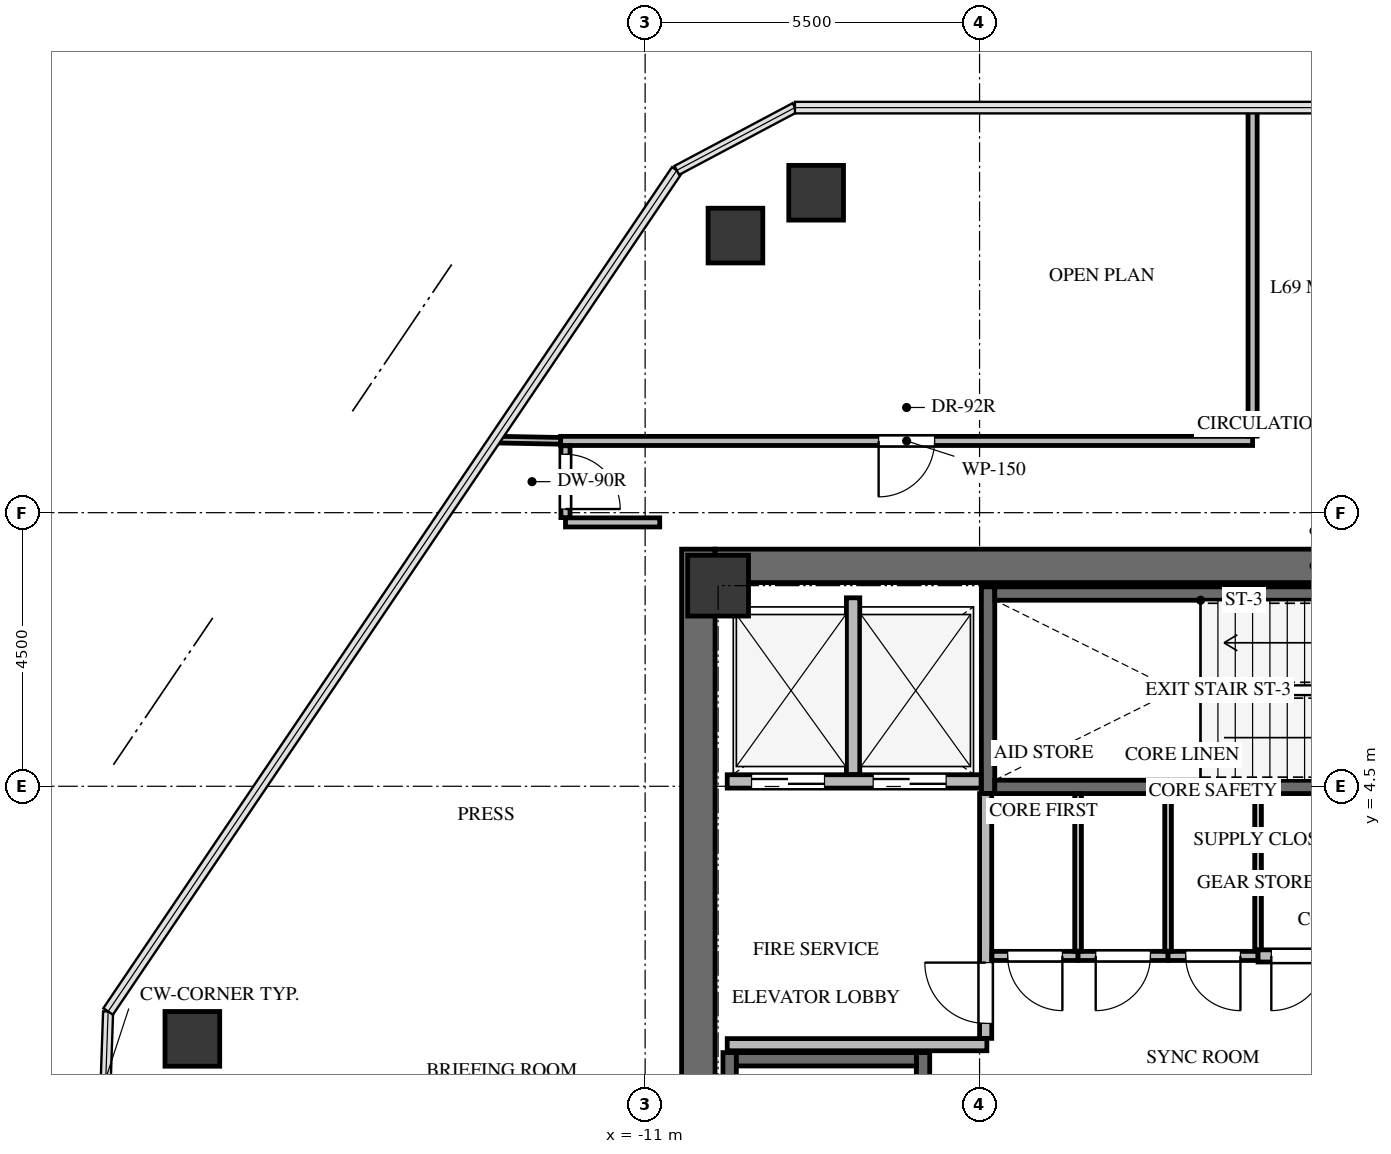
"""IFC4 building model, lengths in metres.
Left out: names, types, materials, properties, quantities, classifications, styles, units other than length and angle.
Written with IfcOpenShell. Run it as: python <this file> out.ifc"""

import sys

from ifc_helpers import new_model, si_unit, direction, frame, frame_2d, origin, origin_2d, place, context, subcontext, project, spatial, rectangle, extrude, source, transform, mapped, element, fill, save


model = new_model("IFC4")
c1 = context("Model", 3, precision=1e-05, world=origin(), true_north=direction((0.0, 1.0)))
c2 = subcontext(c1, "Body", "Model", "MODEL_VIEW")
j1 = project(units=[si_unit("LENGTHUNIT", "METRE"), si_unit("PLANEANGLEUNIT", "RADIAN")], contexts=[c1])
p1 = place(None, origin())
s1 = spatial("IfcSite", under=j1, at=p1, CompositionType="ELEMENT")
p2 = place(p1, origin())
s2 = spatial("IfcBuilding", under=s1, at=p2, CompositionType="ELEMENT")
p3 = place(p2, frame((0.0, 0.0, 248.0)))
s3 = spatial("IfcBuildingStorey", under=s2, at=p3, CompositionType="ELEMENT", Elevation=248.0)
p4 = place(p3, frame((-10.125, -8.4, 0.0), z_axis=(0.0, 0.0, 1.0), x_axis=(0.0, 1.0, 0.0)))
e1 = element("IfcWall", 1, at=p4, inside=s3, PredefinedType="SHEAR", context=c2, shape_type="SweptSolid", body=[
    extrude(rectangle(XDim=16.8, YDim=0.55, at=frame_2d((8.4, 0.0))), origin(), (0.0, 0.0, 1.0), 3.3),
])
p5 = place(p3, frame((-9.85, 8.125, 0.0), z_axis=(0.0, 0.0, 1.0), x_axis=(1.0, 0.0, 0.0)))
e2 = element("IfcWall", 2, at=p5, inside=s3, PredefinedType="SHEAR", context=c2, shape_type="SweptSolid", body=[
    extrude(rectangle(XDim=19.7, YDim=0.55, at=frame_2d((9.85, 0.0))), origin(), (0.0, 0.0, 1.0), 3.3),
])
p6 = place(p3, frame((-6.43, -7.77, -0.24), z_axis=(0.0, 0.0, 1.0), x_axis=(0.0, 1.0, 0.0)))
e3 = element("IfcWall", 3, at=p6, inside=s3, PredefinedType="SHEAR", context=c2, shape_type="SweptSolid", body=[
    extrude(rectangle(XDim=7.89, YDim=0.22, at=frame_2d((3.945, 0.0))), origin(), (0.0, 0.0, 1.0), 3.3),
])
p7 = place(p6, frame((6.32, 0.0, 0.0)))
e4 = element("IfcOpeningElement", 4, at=p7, cuts=e3, PredefinedType="OPENING", context=c2, shape_type="SweptSolid", body=[
    extrude(rectangle(XDim=1.05, YDim=2.15, at=frame_2d((0.525, 1.075))), frame((0.0, 0.12, 0.0), z_axis=(0.0, -1.0, 0.0), x_axis=(1.0, 0.0, 0.0)), (0.0, 0.0, 1.0), 0.24),
])
p8 = place(p3, frame((-9.61, 0.12, -0.24), z_axis=(0.0, 0.0, 1.0), x_axis=(0.0, -1.0, 0.0)))
e5 = element("IfcWall", 5, at=p8, inside=s3, PredefinedType="SHEAR", context=c2, shape_type="SweptSolid", body=[
    extrude(rectangle(XDim=7.89, YDim=0.22, at=frame_2d((3.945, 0.0))), origin(), (0.0, 0.0, 1.0), 3.3),
])
p9 = place(p3, frame((-6.54, 0.01, -0.24), z_axis=(0.0, 0.0, 1.0), x_axis=(-1.0, 0.0, 0.0)))
e6 = element("IfcWall", 6, at=p9, inside=s3, PredefinedType="SHEAR", context=c2, shape_type="SweptSolid", body=[
    extrude(rectangle(XDim=2.96, YDim=0.22, at=frame_2d((1.48, 0.0))), origin(), (0.0, 0.0, 1.0), 3.3),
])
p10 = place(p3, frame((-5.36, 7.78, -0.24), z_axis=(0.0, 0.0, 1.0), x_axis=(0.0, -1.0, 0.0)))
e7 = element("IfcWall", 7, at=p10, inside=s3, PredefinedType="SHEAR", context=c2, shape_type="SweptSolid", body=[
    extrude(rectangle(XDim=3.4, YDim=0.22, at=frame_2d((1.7, 0.0))), origin(), (0.0, 0.0, 1.0), 3.3),
])
p11 = place(p3, frame((-5.25, 4.49, -0.24), z_axis=(0.0, 0.0, 1.0), x_axis=(1.0, 0.0, 0.0)))
e8 = element("IfcWall", 8, at=p11, inside=s3, PredefinedType="SHEAR", context=c2, shape_type="SweptSolid", body=[
    extrude(rectangle(XDim=7.35, YDim=0.22, at=frame_2d((3.675, 0.0))), origin(), (0.0, 0.0, 1.0), 3.3),
])
p12 = place(p11, frame((5.85, 0.0, 0.0)))
e9 = element("IfcOpeningElement", 9, at=p12, cuts=e8, PredefinedType="OPENING", context=c2, shape_type="SweptSolid", body=[
    extrude(rectangle(XDim=1.05, YDim=2.15, at=frame_2d((0.525, 1.075))), frame((0.0, 0.12, 0.0), z_axis=(0.0, -1.0, 0.0), x_axis=(1.0, 0.0, 0.0)), (0.0, 0.0, 1.0), 0.24),
])
p13 = place(p3, frame((2.1, 7.67, -0.24), z_axis=(0.0, 0.0, 1.0), x_axis=(-1.0, 0.0, 0.0)))
e10 = element("IfcWall", 10, at=p13, inside=s3, PredefinedType="SHEAR", context=c2, shape_type="SweptSolid", body=[
    extrude(rectangle(XDim=7.35, YDim=0.22, at=frame_2d((3.675, 0.0))), origin(), (0.0, 0.0, 1.0), 3.3),
])
m1 = source(origin(), c2, "Body", "SweptSolid", [
    extrude(rectangle(XDim=1.0, YDim=1.0, at=origin_2d()), origin(), (0.0, 0.0, 1.0), 3.3),
])
p14 = place(p3, frame((-9.8, 7.8, -0.24), z_axis=(0.0, 0.0, 1.0), x_axis=(1.0, 0.0, 0.0)))
e11 = element("IfcColumn", 11, at=p14, inside=s3, PredefinedType="COLUMN", context=c2, shape_type="MappedRepresentation", body=[
    mapped(m1, transform((0.0, 0.0, 0.0), x_axis=(1.0, 0.0, 0.0), y_axis=(0.0, 1.0, 0.0), z_axis=(0.0, 0.0, 1.0), scale=1.0)),
])
m2 = source(origin(), c2, "Body", "SweptSolid", [
    extrude(rectangle(XDim=0.9, YDim=0.9, at=origin_2d()), origin(), (0.0, 0.0, 1.0), 3.3),
])
for number, where, z_axis, x_axis in (
    (12, (-18.446, 0.346, -0.24), (0.0, 0.0, 1.0), (1.0, 0.0, 0.0)),
    (13, (-9.515, 13.557, -0.24), (0.0, 0.0, 1.0), (1.0, 0.0, 0.0)),
    (14, (-8.188, 14.262, -0.24), (0.0, 0.0, 1.0), (1.0, 0.0, 0.0)),
):
    element("IfcColumn", number, at=place(p3, frame(where, z_axis=z_axis, x_axis=x_axis)), inside=s3, PredefinedType="COLUMN", context=c2, shape_type="MappedRepresentation", body=[
        mapped(m2, transform((0.0, 0.0, 0.0), x_axis=(1.0, 0.0, 0.0), y_axis=(0.0, 1.0, 0.0), z_axis=(0.0, 0.0, 1.0), scale=1.0)),
    ])
p15 = place(p3, frame((-9.65, 4.58, 0.0), z_axis=(0.0, 0.0, 1.0), x_axis=(1.0, 0.0, 0.0)))
e15 = element("IfcWall", 15, at=p15, inside=s3, PredefinedType="SOLIDWALL", context=c2, shape_type="SweptSolid", body=[
    extrude(rectangle(XDim=4.175, YDim=0.22, at=frame_2d((2.087, 0.0))), origin(), (0.0, 0.0, 1.0), 3.045),
])
p16 = place(p15, frame((0.4, 0.0, 0.0)))
e16 = element("IfcOpeningElement", 16, at=p16, cuts=e15, PredefinedType="OPENING", context=c2, shape_type="SweptSolid", body=[
    extrude(rectangle(XDim=1.2, YDim=2.15, at=frame_2d((0.6, 1.075))), frame((0.0, 0.12, 0.0), z_axis=(0.0, -1.0, 0.0), x_axis=(1.0, 0.0, 0.0)), (0.0, 0.0, 1.0), 0.24),
])
p17 = place(p15, frame((2.4, 0.0, 0.0)))
e17 = element("IfcOpeningElement", 17, at=p17, cuts=e15, PredefinedType="OPENING", context=c2, shape_type="SweptSolid", body=[
    extrude(rectangle(XDim=1.2, YDim=2.15, at=frame_2d((0.6, 1.075))), frame((0.0, 0.12, 0.0), z_axis=(0.0, -1.0, 0.0), x_axis=(1.0, 0.0, 0.0)), (0.0, 0.0, 1.0), 0.24),
])
p18 = place(p3, frame((-7.58, 4.694, 0.0), z_axis=(0.0, 0.0, 1.0), x_axis=(0.0, 1.0, 0.0)))
e18 = element("IfcWall", 18, at=p18, inside=s3, PredefinedType="SOLIDWALL", context=c2, shape_type="SweptSolid", body=[
    extrude(rectangle(XDim=2.906, YDim=0.22, at=frame_2d((1.453, 0.0))), origin(), (0.0, 0.0, 1.0), 3.045),
])
p19 = place(p3, frame((-9.65, 0.25, 0.0), z_axis=(0.0, 0.0, 1.0), x_axis=(1.0, 0.0, 0.0)))
e19 = element("IfcWall", 19, at=p19, inside=s3, PredefinedType="SOLIDWALL", context=c2, shape_type="SweptSolid", body=[
    extrude(rectangle(XDim=4.27, YDim=0.2, at=frame_2d((2.135, 0.0))), origin(), (0.0, 0.0, 1.0), 3.045),
])
p20 = place(p3, frame((-5.4, 0.354, 0.0), z_axis=(0.0, 0.0, 1.0), x_axis=(0.0, 1.0, 0.0)))
e20 = element("IfcWall", 20, at=p20, inside=s3, PredefinedType="SOLIDWALL", context=c2, shape_type="SweptSolid", body=[
    extrude(rectangle(XDim=4.026, YDim=0.2, at=frame_2d((2.013, 0.0))), origin(), (0.0, 0.0, 1.0), 3.045),
])
p21 = place(p20, frame((0.246, 0.0, 0.0)))
e21 = element("IfcOpeningElement", 21, at=p21, cuts=e20, PredefinedType="OPENING", context=c2, shape_type="SweptSolid", body=[
    extrude(rectangle(XDim=1.0, YDim=2.15, at=frame_2d((0.5, 1.075))), frame((0.0, 0.11, 0.0), z_axis=(0.0, -1.0, 0.0), x_axis=(1.0, 0.0, 0.0)), (0.0, 0.0, 1.0), 0.22),
])
p22 = place(p3, frame((-3.88, 1.71, 0.0), z_axis=(0.0, 0.0, 1.0), x_axis=(-1.0, 0.0, 0.0)))
e22 = element("IfcWall", 22, at=p22, inside=s3, PredefinedType="PARTITIONING", context=c2, shape_type="SweptSolid", body=[
    extrude(rectangle(XDim=1.416, YDim=0.15, at=frame_2d((0.708, 0.0))), origin(), (0.0, 0.0, 1.0), 3.045),
])
p23 = place(p22, frame((0.258, 0.0, 0.0)))
e23 = element("IfcOpeningElement", 23, at=p23, cuts=e22, PredefinedType="OPENING", context=c2, shape_type="SweptSolid", body=[
    extrude(rectangle(XDim=0.9, YDim=2.05, at=frame_2d((0.45, 1.025))), frame((0.0, 0.085, 0.0), z_axis=(0.0, -1.0, 0.0), x_axis=(1.0, 0.0, 0.0)), (0.0, 0.0, 1.0), 0.17),
])
p24 = place(p3, frame((-2.4, 1.71, 0.0), z_axis=(0.0, 0.0, 1.0), x_axis=(-1.0, 0.0, 0.0)))
e24 = element("IfcWall", 24, at=p24, inside=s3, PredefinedType="PARTITIONING", context=c2, shape_type="SweptSolid", body=[
    extrude(rectangle(XDim=1.48, YDim=0.15, at=frame_2d((0.74, 0.0))), origin(), (0.0, 0.0, 1.0), 3.045),
])
p25 = place(p24, frame((0.29, 0.0, 0.0)))
e25 = element("IfcOpeningElement", 25, at=p25, cuts=e24, PredefinedType="OPENING", context=c2, shape_type="SweptSolid", body=[
    extrude(rectangle(XDim=0.9, YDim=2.05, at=frame_2d((0.45, 1.025))), frame((0.0, 0.085, 0.0), z_axis=(0.0, -1.0, 0.0), x_axis=(1.0, 0.0, 0.0)), (0.0, 0.0, 1.0), 0.17),
])
p26 = place(p3, frame((-0.92, 1.71, 0.0), z_axis=(0.0, 0.0, 1.0), x_axis=(-1.0, 0.0, 0.0)))
e26 = element("IfcWall", 26, at=p26, inside=s3, PredefinedType="PARTITIONING", context=c2, shape_type="SweptSolid", body=[
    extrude(rectangle(XDim=1.48, YDim=0.15, at=frame_2d((0.74, 0.0))), origin(), (0.0, 0.0, 1.0), 3.045),
])
p27 = place(p26, frame((0.29, 0.0, 0.0)))
e27 = element("IfcOpeningElement", 27, at=p27, cuts=e26, PredefinedType="OPENING", context=c2, shape_type="SweptSolid", body=[
    extrude(rectangle(XDim=0.9, YDim=2.05, at=frame_2d((0.45, 1.025))), frame((0.0, 0.085, 0.0), z_axis=(0.0, -1.0, 0.0), x_axis=(1.0, 0.0, 0.0)), (0.0, 0.0, 1.0), 0.17),
])
p28 = place(p3, frame((0.416, 1.71, 0.0), z_axis=(0.0, 0.0, 1.0), x_axis=(-1.0, 0.0, 0.0)))
e28 = element("IfcWall", 28, at=p28, inside=s3, PredefinedType="SOLIDWALL", context=c2, shape_type="SweptSolid", body=[
    extrude(rectangle(XDim=1.336, YDim=0.2, at=frame_2d((0.668, 0.0))), origin(), (0.0, 0.0, 1.0), 3.045),
])
p29 = place(p28, frame((0.218, 0.0, 0.0)))
e29 = element("IfcOpeningElement", 29, at=p29, cuts=e28, PredefinedType="OPENING", context=c2, shape_type="SweptSolid", body=[
    extrude(rectangle(XDim=0.9, YDim=2.05, at=frame_2d((0.45, 1.025))), frame((0.0, 0.11, 0.0), z_axis=(0.0, -1.0, 0.0), x_axis=(1.0, 0.0, 0.0)), (0.0, 0.0, 1.0), 0.22),
])
p30 = place(p3, frame((-1.01, 10.18, 0.0), z_axis=(0.0, 0.0, 1.0), x_axis=(-1.0, 0.0, 0.0)))
e30 = element("IfcWall", 30, at=p30, inside=s3, PredefinedType="PARTITIONING", context=c2, shape_type="SweptSolid", body=[
    extrude(rectangle(XDim=11.38, YDim=0.15, at=frame_2d((5.69, 0.0))), origin(), (0.0, 0.0, 1.0), 2.301),
])
p31 = place(p30, frame((5.23, 0.0, 0.0)))
e31 = element("IfcOpeningElement", 31, at=p31, cuts=e30, PredefinedType="OPENING", context=c2, shape_type="SweptSolid", body=[
    extrude(rectangle(XDim=0.92, YDim=2.1, at=frame_2d((0.46, 1.05))), frame((0.0, 0.085, 0.0), z_axis=(0.0, -1.0, 0.0), x_axis=(1.0, 0.0, 0.0)), (0.0, 0.0, 1.0), 0.17),
])
p32 = place(p3, frame((-1.01, 15.662, 0.0), z_axis=(0.0, 0.0, 1.0), x_axis=(0.0, -1.0, 0.0)))
e32 = element("IfcWall", 32, at=p32, inside=s3, PredefinedType="PARTITIONING", context=c2, shape_type="SweptSolid", body=[
    extrude(rectangle(XDim=5.403, YDim=0.15, at=frame_2d((2.702, 0.0))), origin(), (0.0, 0.0, 1.0), 2.399),
])
p33 = place(p3, frame((-12.31, 8.84, 0.0), z_axis=(0.0, 0.0, 1.0), x_axis=(1.0, 0.0, 0.0)))
e33 = element("IfcWall", 33, at=p33, inside=s3, PredefinedType="PARTITIONING", context=c2, shape_type="SweptSolid", body=[
    extrude(rectangle(XDim=1.55, YDim=0.15, at=frame_2d((0.775, 0.0))), origin(), (0.0, 0.0, 1.0), 3.045),
])
p34 = place(p3, frame((-12.31, 10.101, 0.0), z_axis=(0.0, 0.0, 1.0), x_axis=(0.0, -1.0, 0.0)))
e34 = element("IfcWall", 34, at=p34, inside=s3, PredefinedType="PARTITIONING", context=c2, shape_type="SweptSolid", body=[
    extrude(rectangle(XDim=1.182, YDim=0.15, at=frame_2d((0.591, 0.0))), origin(), (0.0, 0.0, 1.0), 2.399),
])
p35 = place(p34, frame((0.141, 0.0, 0.0)))
e35 = element("IfcOpeningElement", 35, at=p35, cuts=e34, PredefinedType="OPENING", context=c2, shape_type="SweptSolid", body=[
    extrude(rectangle(XDim=0.9, YDim=2.05, at=frame_2d((0.45, 1.025))), frame((0.0, 0.085, 0.0), z_axis=(0.0, -1.0, 0.0), x_axis=(1.0, 0.0, 0.0)), (0.0, 0.0, 1.0), 0.17),
])
for number, where, z_axis, x_axis in (
    (36, (-3.88, 4.375, 0.0), (0.0, 0.0, 1.0), (0.0, -1.0, 0.0)),
    (37, (-2.4, 4.375, 0.0), (0.0, 0.0, 1.0), (0.0, -1.0, 0.0)),
):
    element("IfcWall", number, at=place(p3, frame(where, z_axis=z_axis, x_axis=x_axis)), inside=s3, PredefinedType="MOVABLE", context=c2, shape_type="SweptSolid", body=[
        extrude(rectangle(XDim=2.586, YDim=0.11, at=frame_2d((1.293, 0.0))), origin(), (0.0, 0.0, 1.0), 3.045),
    ])
p36 = place(p3, frame((-0.92, 4.375, 0.0), z_axis=(0.0, 0.0, 1.0), x_axis=(0.0, -1.0, 0.0)))
e38 = element("IfcWall", 38, at=p36, inside=s3, PredefinedType="MOVABLE", context=c2, shape_type="SweptSolid", body=[
    extrude(rectangle(XDim=2.561, YDim=0.11, at=frame_2d((1.281, 0.0))), origin(), (0.0, 0.0, 1.0), 3.045),
])
p37 = place(p3, frame((-12.39, 10.181, 0.0), z_axis=(0.0, 0.0, 1.0), x_axis=(-0.999812128272, 0.019383192748, 0.0)))
e39 = element("IfcWall", 39, at=p37, inside=s3, PredefinedType="MOVABLE", context=c2, shape_type="SweptSolid", body=[
    extrude(rectangle(XDim=1.083, YDim=0.11, at=frame_2d((0.542, 0.0))), origin(), (0.0, 0.0, 1.0), 3.045),
])
m3 = source(origin(), c2, "Body", "SweptSolid", [
    extrude(rectangle(XDim=1.2, YDim=2.15, at=frame_2d((0.6, 1.075))), frame((0.0, 0.025, 0.0), z_axis=(0.0, -1.0, 0.0), x_axis=(1.0, 0.0, 0.0)), (0.0, 0.0, 1.0), 0.05),
])
p38 = place(p16, origin())
e40 = element("IfcDoor", 40, at=p38, inside=s3, OperationType="DOUBLE_DOOR_SLIDING", PredefinedType="DOOR", context=c2, shape_type="MappedRepresentation", body=[
    mapped(m3, transform((0.0, 0.0, 0.0), x_axis=(1.0, 0.0, 0.0), y_axis=(0.0, 1.0, 0.0), z_axis=(0.0, 0.0, 1.0), scale=1.0)),
])
fill(e16, e40)
p39 = place(p17, origin())
e41 = element("IfcDoor", 41, at=p39, inside=s3, OperationType="DOUBLE_DOOR_SLIDING", PredefinedType="DOOR", context=c2, shape_type="MappedRepresentation", body=[
    mapped(m3, transform((0.0, 0.0, 0.0), x_axis=(1.0, 0.0, 0.0), y_axis=(0.0, 1.0, 0.0), z_axis=(0.0, 0.0, 1.0), scale=1.0)),
])
fill(e17, e41)
m4 = source(origin(), c2, "Body", "SweptSolid", [
    extrude(rectangle(XDim=1.0, YDim=2.15, at=frame_2d((0.5, 1.075))), frame((0.0, 0.025, 0.0), z_axis=(0.0, -1.0, 0.0), x_axis=(1.0, 0.0, 0.0)), (0.0, 0.0, 1.0), 0.05),
])
p40 = place(p21, origin())
e42 = element("IfcDoor", 42, at=p40, inside=s3, OperationType="SINGLE_SWING_RIGHT", PredefinedType="DOOR", context=c2, shape_type="MappedRepresentation", body=[
    mapped(m4, transform((0.0, 0.0, 0.0), x_axis=(1.0, 0.0, 0.0), y_axis=(0.0, 1.0, 0.0), z_axis=(0.0, 0.0, 1.0), scale=1.0)),
])
fill(e21, e42)
m5 = source(origin(), c2, "Body", "SweptSolid", [
    extrude(rectangle(XDim=0.9, YDim=2.05, at=frame_2d((0.45, 1.025))), frame((0.0, 0.025, 0.0), z_axis=(0.0, -1.0, 0.0), x_axis=(1.0, 0.0, 0.0)), (0.0, 0.0, 1.0), 0.05),
])
p41 = place(p23, origin())
e43 = element("IfcDoor", 43, at=p41, inside=s3, OperationType="SINGLE_SWING_LEFT", PredefinedType="DOOR", context=c2, shape_type="MappedRepresentation", body=[
    mapped(m5, transform((0.0, 0.0, 0.0), x_axis=(1.0, 0.0, 0.0), y_axis=(0.0, 1.0, 0.0), z_axis=(0.0, 0.0, 1.0), scale=1.0)),
])
fill(e23, e43)
m6 = source(origin(), c2, "Body", "SweptSolid", [
    extrude(rectangle(XDim=0.9, YDim=2.05, at=frame_2d((0.45, 1.025))), frame((0.0, 0.025, 0.0), z_axis=(0.0, -1.0, 0.0), x_axis=(1.0, 0.0, 0.0)), (0.0, 0.0, 1.0), 0.05),
])
p42 = place(p25, origin())
e44 = element("IfcDoor", 44, at=p42, inside=s3, OperationType="SINGLE_SWING_RIGHT", PredefinedType="DOOR", context=c2, shape_type="MappedRepresentation", body=[
    mapped(m6, transform((0.0, 0.0, 0.0), x_axis=(1.0, 0.0, 0.0), y_axis=(0.0, 1.0, 0.0), z_axis=(0.0, 0.0, 1.0), scale=1.0)),
])
fill(e25, e44)
p43 = place(p27, origin())
e45 = element("IfcDoor", 45, at=p43, inside=s3, OperationType="SINGLE_SWING_LEFT", PredefinedType="DOOR", context=c2, shape_type="MappedRepresentation", body=[
    mapped(m5, transform((0.0, 0.0, 0.0), x_axis=(1.0, 0.0, 0.0), y_axis=(0.0, 1.0, 0.0), z_axis=(0.0, 0.0, 1.0), scale=1.0)),
])
fill(e27, e45)
p44 = place(p29, origin())
e46 = element("IfcDoor", 46, at=p44, inside=s3, OperationType="SINGLE_SWING_RIGHT", PredefinedType="DOOR", context=c2, shape_type="MappedRepresentation", body=[
    mapped(m6, transform((0.0, 0.0, 0.0), x_axis=(1.0, 0.0, 0.0), y_axis=(0.0, 1.0, 0.0), z_axis=(0.0, 0.0, 1.0), scale=1.0)),
])
fill(e29, e46)
m7 = source(origin(), c2, "Body", "SweptSolid", [
    extrude(rectangle(XDim=0.92, YDim=2.1, at=frame_2d((0.46, 1.05))), frame((0.0, 0.025, 0.0), z_axis=(0.0, -1.0, 0.0), x_axis=(1.0, 0.0, 0.0)), (0.0, 0.0, 1.0), 0.05),
])
p45 = place(p31, origin())
e47 = element("IfcDoor", 47, at=p45, inside=s3, OperationType="SINGLE_SWING_RIGHT", PredefinedType="DOOR", context=c2, shape_type="MappedRepresentation", body=[
    mapped(m7, transform((0.0, 0.0, 0.0), x_axis=(1.0, 0.0, 0.0), y_axis=(0.0, 1.0, 0.0), z_axis=(0.0, 0.0, 1.0), scale=1.0)),
])
fill(e31, e47)
m8 = source(origin(), c2, "Body", "SweptSolid", [
    extrude(rectangle(XDim=0.9, YDim=2.05, at=frame_2d((0.45, 1.025))), frame((0.0, 0.025, 0.0), z_axis=(0.0, -1.0, 0.0), x_axis=(1.0, 0.0, 0.0)), (0.0, 0.0, 1.0), 0.05),
])
p46 = place(p35, origin())
e48 = element("IfcDoor", 48, at=p46, inside=s3, OperationType="SINGLE_SWING_RIGHT", PredefinedType="DOOR", context=c2, shape_type="MappedRepresentation", body=[
    mapped(m8, transform((0.0, 0.0, 0.0), x_axis=(1.0, 0.0, 0.0), y_axis=(0.0, 1.0, 0.0), z_axis=(0.0, 0.0, 1.0), scale=1.0)),
])
fill(e35, e48)
save(model, sys.argv[1])
